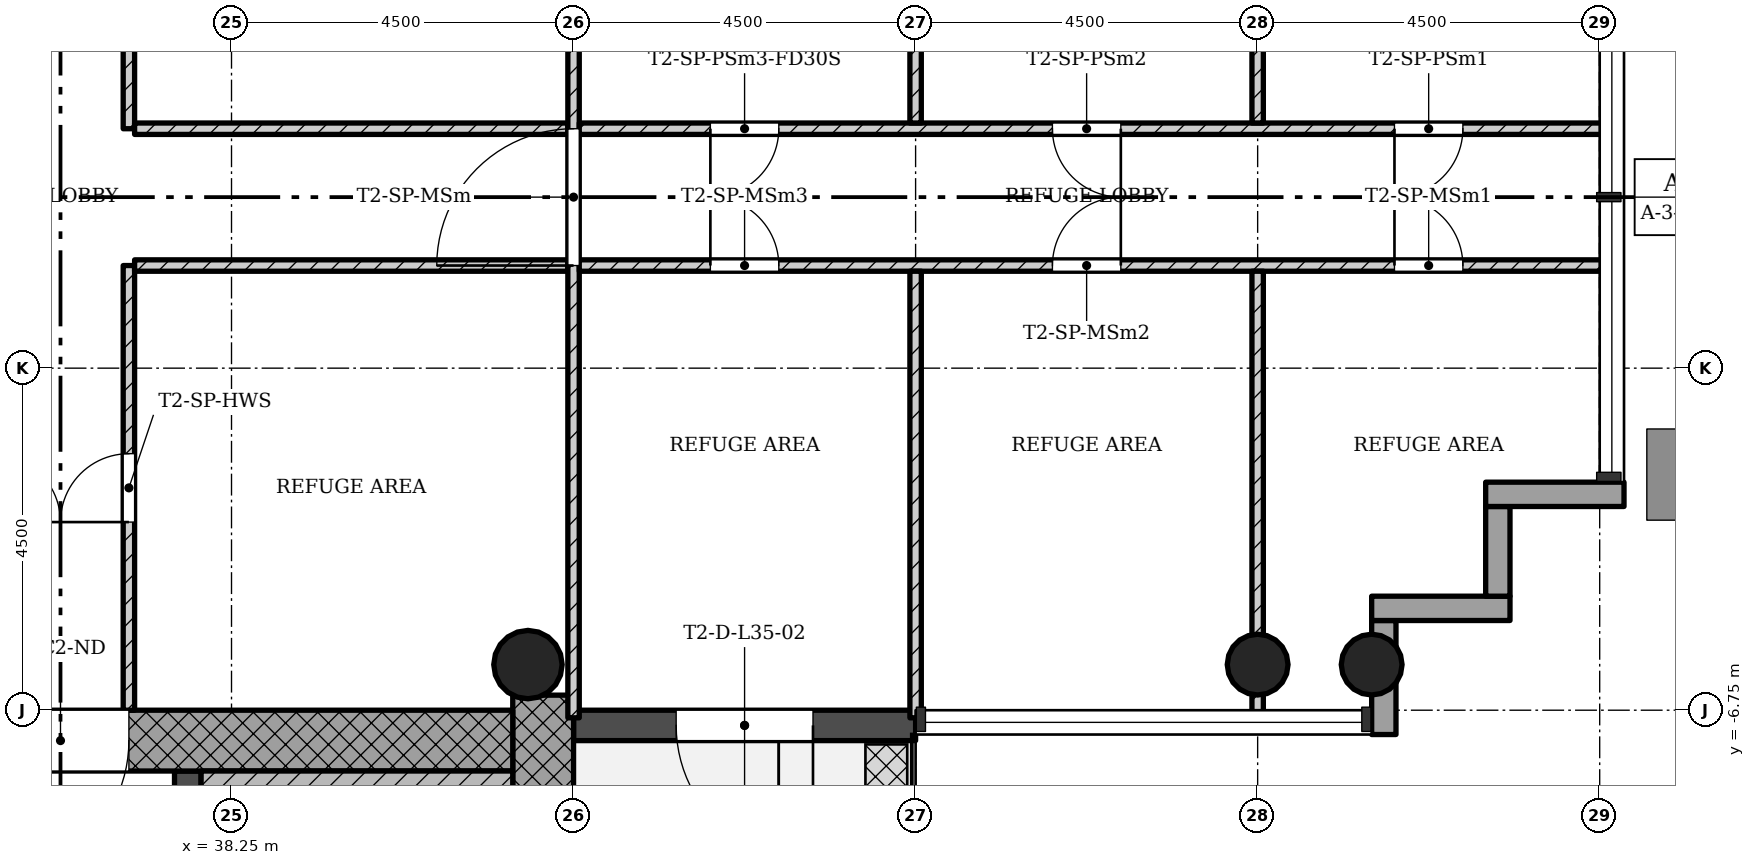
"""IFC4 building model, lengths in metres.
Left out: names, types, materials, properties, quantities, classifications, styles, units other than length and angle.
Written with IfcOpenShell. Run it as: python <this file> out.ifc"""

import sys

from ifc_helpers import new_model, si_unit, direction, frame, frame_2d, origin, origin_2d, place, context, subcontext, project, spatial, rectangle, hollow_circle, extrude, element, fill, save


model = new_model("IFC4")
c1 = context("Model", 3, precision=1e-05, world=origin(), true_north=direction((0.0, 1.0)))
c2 = subcontext(c1, "Body", "Model", "MODEL_VIEW")
j1 = project(units=[si_unit("LENGTHUNIT", "METRE"), si_unit("PLANEANGLEUNIT", "RADIAN")], contexts=[c1])
p1 = place(None, origin())
s1 = spatial("IfcSite", under=j1, at=p1, CompositionType="ELEMENT")
p2 = place(p1, origin())
s2 = spatial("IfcBuilding", under=s1, at=p2, CompositionType="ELEMENT")
p3 = place(p2, frame((0.0, 0.0, 128.7)))
s3 = spatial("IfcBuildingStorey", under=s2, at=p3, CompositionType="ELEMENT", Elevation=128.7)
p4 = place(p3, frame((42.35, -14.95, 0.0), z_axis=(0.0, 0.0, 1.0), x_axis=(0.0, 1.0, 0.0)))
e1 = element("IfcWall", 1, at=p4, inside=s3, PredefinedType="SHEAR", context=c2, shape_type="SweptSolid", body=[
    extrude(rectangle(XDim=8.398, YDim=0.8, at=frame_2d((4.199, 0.0))), origin(), (0.0, 0.0, 1.0), 5.0),
])
p5 = place(p3, frame((41.95, -7.15, 0.0), z_axis=(0.0, 0.0, 1.0), x_axis=(-1.0, 0.0, 0.0)))
e2 = element("IfcWall", 2, at=p5, inside=s3, PredefinedType="SHEAR", context=c2, shape_type="SweptSolid", body=[
    extrude(rectangle(XDim=12.7, YDim=0.8, at=frame_2d((6.35, 0.0))), origin(), (0.0, 0.0, 1.0), 5.0),
])
p6 = place(p5, frame((5.05, 0.0, 0.0)))
e3 = element("IfcOpeningElement", 3, at=p6, cuts=e2, PredefinedType="OPENING", context=c2, shape_type="SweptSolid", body=[
    extrude(rectangle(XDim=1.8, YDim=2.1, at=frame_2d((0.9, 1.05))), frame((0.0, 0.41, 0.0), z_axis=(0.0, -1.0, 0.0), x_axis=(1.0, 0.0, 0.0)), (0.0, 0.0, 1.0), 0.82),
])
p7 = place(p3, frame((37.675, -14.95, 0.0), z_axis=(0.0, 0.0, 1.0), x_axis=(0.0, 1.0, 0.0)))
e4 = element("IfcWall", 4, at=p7, inside=s3, PredefinedType="SHEAR", context=c2, shape_type="SweptSolid", body=[
    extrude(rectangle(XDim=7.4, YDim=0.35, at=frame_2d((3.7, 0.0))), origin(), (0.0, 0.0, 1.0), 5.0),
])
p8 = place(p7, frame((5.65, 0.0, 0.0)))
e5 = element("IfcOpeningElement", 5, at=p8, cuts=e4, PredefinedType="OPENING", context=c2, shape_type="SweptSolid", body=[
    extrude(rectangle(XDim=0.9, YDim=2.1, at=frame_2d((0.45, 1.05))), frame((0.0, 0.185, 0.0), z_axis=(0.0, -1.0, 0.0), x_axis=(1.0, 0.0, 0.0)), (0.0, 0.0, 1.0), 0.37),
])
for number, where, z_axis, x_axis in (
    (6, (51.75, -6.15, 0.0), (0.0, 0.0, 1.0), (1.0, 0.0, 0.0)),
    (7, (53.25, -6.15, 0.0), (0.0, 0.0, 1.0), (1.0, 0.0, 0.0)),
):
    element("IfcColumn", number, at=place(p3, frame(where, z_axis=z_axis, x_axis=x_axis)), inside=s3, PredefinedType="COLUMN", context=c2, shape_type="SweptSolid", body=[
        extrude(hollow_circle(Radius=0.4, WallThickness=0.028, at=origin_2d()), origin(), (0.0, 0.0, 1.0), 5.0),
    ])
p9 = place(p3, frame((42.15, -6.15, 0.0), z_axis=(0.0, 0.0, 1.0), x_axis=(1.0, 0.0, 0.0)))
e8 = element("IfcColumn", 8, at=p9, inside=s3, PredefinedType="COLUMN", context=c2, shape_type="SweptSolid", body=[
    extrude(hollow_circle(Radius=0.45, WallThickness=0.032, at=origin_2d()), origin(), (0.0, 0.0, 1.0), 5.0),
])
p10 = place(p3, frame((42.75, -6.95, -0.02), z_axis=(0.0, 0.0, 1.0), x_axis=(1.0, 0.0, 0.0)))
e9 = element("IfcWall", 9, at=p10, inside=s3, PredefinedType="STANDARD", context=c2, shape_type="SweptSolid", body=[
    extrude(rectangle(XDim=4.5, YDim=0.4, at=frame_2d((2.25, 0.0))), origin(), (0.0, 0.0, 1.0), 4.72),
])
p11 = place(p10, frame((1.35, 0.0, 0.02)))
e10 = element("IfcOpeningElement", 10, at=p11, cuts=e9, PredefinedType="OPENING", context=c2, shape_type="SweptSolid", body=[
    extrude(rectangle(XDim=1.8, YDim=2.1, at=frame_2d((0.9, 1.05))), frame((0.0, 0.21, 0.0), z_axis=(0.0, -1.0, 0.0), x_axis=(1.0, 0.0, 0.0)), (0.0, 0.0, 1.0), 0.42),
])
p12 = place(p3, frame((53.41, -7.07, -0.3), z_axis=(0.0, 0.0, 1.0), x_axis=(0.0, 1.0, 0.0)))
e11 = element("IfcWall", 11, at=p12, inside=s3, PredefinedType="STANDARD", context=c2, shape_type="SweptSolid", body=[
    extrude(rectangle(XDim=1.5, YDim=0.32, at=frame_2d((0.75, 0.0))), origin(), (0.0, 0.0, 1.0), 5.0),
])
p13 = place(p3, frame((53.25, -5.41, -0.3), z_axis=(0.0, 0.0, 1.0), x_axis=(1.0, 0.0, 0.0)))
e12 = element("IfcWall", 12, at=p13, inside=s3, PredefinedType="STANDARD", context=c2, shape_type="SweptSolid", body=[
    extrude(rectangle(XDim=1.82, YDim=0.32, at=frame_2d((0.91, 0.0))), origin(), (0.0, 0.0, 1.0), 5.0),
])
p14 = place(p3, frame((54.91, -5.25, -0.3), z_axis=(0.0, 0.0, 1.0), x_axis=(0.0, 1.0, 0.0)))
e13 = element("IfcWall", 13, at=p14, inside=s3, PredefinedType="STANDARD", context=c2, shape_type="SweptSolid", body=[
    extrude(rectangle(XDim=1.18, YDim=0.32, at=frame_2d((0.59, 0.0))), origin(), (0.0, 0.0, 1.0), 5.0),
])
p15 = place(p3, frame((54.75, -3.91, -0.3), z_axis=(0.0, 0.0, 1.0), x_axis=(1.0, 0.0, 0.0)))
e14 = element("IfcWall", 14, at=p15, inside=s3, PredefinedType="STANDARD", context=c2, shape_type="SweptSolid", body=[
    extrude(rectangle(XDim=1.82, YDim=0.32, at=frame_2d((0.91, 0.0))), origin(), (0.0, 0.0, 1.0), 5.0),
])
p16 = place(p3, frame((36.9, 0.9, 0.0), z_axis=(0.0, 0.0, 1.0), x_axis=(0.0, 1.0, 0.0)))
e15 = element("IfcWall", 15, at=p16, inside=s3, PredefinedType="PARTITIONING", context=c2, shape_type="SweptSolid", body=[
    extrude(rectangle(XDim=5.85, YDim=0.15, at=frame_2d((2.925, 0.0))), origin(), (0.0, 0.0, 1.0), 4.58),
])
p17 = place(p16, frame((2.475, 0.0, 0.0)))
e16 = element("IfcOpeningElement", 16, at=p17, cuts=e15, PredefinedType="OPENING", context=c2, shape_type="SweptSolid", body=[
    extrude(rectangle(XDim=0.9, YDim=2.1, at=frame_2d((0.45, 1.05))), frame((0.0, 0.085, 0.0), z_axis=(0.0, -1.0, 0.0), x_axis=(1.0, 0.0, 0.0)), (0.0, 0.0, 1.0), 0.17),
])
p18 = place(p3, frame((42.675, 0.9, 0.0), z_axis=(0.0, 0.0, 1.0), x_axis=(-1.0, 0.0, 0.0)))
e17 = element("IfcWall", 17, at=p18, inside=s3, PredefinedType="PARTITIONING", context=c2, shape_type="SweptSolid", body=[
    extrude(rectangle(XDim=5.7, YDim=0.15, at=frame_2d((2.85, 0.0))), origin(), (0.0, 0.0, 1.0), 4.58),
])
p19 = place(p3, frame((36.9, -6.75, 0.0), z_axis=(0.0, 0.0, 1.0), x_axis=(0.0, 1.0, 0.0)))
e18 = element("IfcWall", 18, at=p19, inside=s3, PredefinedType="PARTITIONING", context=c2, shape_type="SweptSolid", body=[
    extrude(rectangle(XDim=5.85, YDim=0.15, at=frame_2d((2.925, 0.0))), origin(), (0.0, 0.0, 1.0), 4.58),
])
p20 = place(p19, frame((2.475, 0.0, 0.0)))
e19 = element("IfcOpeningElement", 19, at=p20, cuts=e18, PredefinedType="OPENING", context=c2, shape_type="SweptSolid", body=[
    extrude(rectangle(XDim=0.9, YDim=2.1, at=frame_2d((0.45, 1.05))), frame((0.0, 0.085, 0.0), z_axis=(0.0, -1.0, 0.0), x_axis=(1.0, 0.0, 0.0)), (0.0, 0.0, 1.0), 0.17),
])
p21 = place(p3, frame((42.675, -0.9, 0.0), z_axis=(0.0, 0.0, 1.0), x_axis=(-1.0, 0.0, 0.0)))
e20 = element("IfcWall", 20, at=p21, inside=s3, PredefinedType="PARTITIONING", context=c2, shape_type="SweptSolid", body=[
    extrude(rectangle(XDim=5.7, YDim=0.15, at=frame_2d((2.85, 0.0))), origin(), (0.0, 0.0, 1.0), 4.58),
])
p22 = place(p3, frame((42.75, -6.85, 0.0), z_axis=(0.0, 0.0, 1.0), x_axis=(0.0, 1.0, 0.0)))
e21 = element("IfcWall", 21, at=p22, inside=s3, PredefinedType="PARTITIONING", context=c2, shape_type="SweptSolid", body=[
    extrude(rectangle(XDim=13.7, YDim=0.15, at=frame_2d((6.85, 0.0))), origin(), (0.0, 0.0, 1.0), 4.58),
])
p23 = place(p22, frame((5.95, 0.0, 0.0)))
e22 = element("IfcOpeningElement", 22, at=p23, cuts=e21, PredefinedType="OPENING", context=c2, shape_type="SweptSolid", body=[
    extrude(rectangle(XDim=1.8, YDim=2.1, at=frame_2d((0.9, 1.05))), frame((0.0, 0.085, 0.0), z_axis=(0.0, -1.0, 0.0), x_axis=(1.0, 0.0, 0.0)), (0.0, 0.0, 1.0), 0.17),
])
p24 = place(p3, frame((56.35, 0.9, 0.0), z_axis=(0.0, 0.0, 1.0), x_axis=(-1.0, 0.0, 0.0)))
e23 = element("IfcWall", 23, at=p24, inside=s3, PredefinedType="PARTITIONING", context=c2, shape_type="SweptSolid", body=[
    extrude(rectangle(XDim=13.525, YDim=0.15, at=frame_2d((6.763, 0.0))), origin(), (0.0, 0.0, 1.0), 4.58),
])
p25 = place(p24, frame((1.9, 0.0, 0.0)))
e24 = element("IfcOpeningElement", 24, at=p25, cuts=e23, PredefinedType="OPENING", context=c2, shape_type="SweptSolid", body=[
    extrude(rectangle(XDim=0.9, YDim=2.1, at=frame_2d((0.45, 1.05))), frame((0.0, 0.085, 0.0), z_axis=(0.0, -1.0, 0.0), x_axis=(1.0, 0.0, 0.0)), (0.0, 0.0, 1.0), 0.17),
])
p26 = place(p24, frame((6.4, 0.0, 0.0)))
e25 = element("IfcOpeningElement", 25, at=p26, cuts=e23, PredefinedType="OPENING", context=c2, shape_type="SweptSolid", body=[
    extrude(rectangle(XDim=0.9, YDim=2.1, at=frame_2d((0.45, 1.05))), frame((0.0, 0.085, 0.0), z_axis=(0.0, -1.0, 0.0), x_axis=(1.0, 0.0, 0.0)), (0.0, 0.0, 1.0), 0.17),
])
p27 = place(p24, frame((10.9, 0.0, 0.0)))
e26 = element("IfcOpeningElement", 26, at=p27, cuts=e23, PredefinedType="OPENING", context=c2, shape_type="SweptSolid", body=[
    extrude(rectangle(XDim=0.9, YDim=2.1, at=frame_2d((0.45, 1.05))), frame((0.0, 0.085, 0.0), z_axis=(0.0, -1.0, 0.0), x_axis=(1.0, 0.0, 0.0)), (0.0, 0.0, 1.0), 0.17),
])
for number, where, z_axis, x_axis in (
    (27, (51.75, 0.975, 0.0), (0.0, 0.0, 1.0), (0.0, 1.0, 0.0)),
    (28, (47.25, 0.975, 0.0), (0.0, 0.0, 1.0), (0.0, 1.0, 0.0)),
):
    element("IfcWall", number, at=place(p3, frame(where, z_axis=z_axis, x_axis=x_axis)), inside=s3, PredefinedType="PARTITIONING", context=c2, shape_type="SweptSolid", body=[
        extrude(rectangle(XDim=5.875, YDim=0.15, at=frame_2d((2.938, 0.0))), origin(), (0.0, 0.0, 1.0), 4.58),
    ])
p28 = place(p3, frame((56.35, -0.9, 0.0), z_axis=(0.0, 0.0, 1.0), x_axis=(-1.0, 0.0, 0.0)))
e29 = element("IfcWall", 29, at=p28, inside=s3, PredefinedType="PARTITIONING", context=c2, shape_type="SweptSolid", body=[
    extrude(rectangle(XDim=13.525, YDim=0.15, at=frame_2d((6.763, 0.0))), origin(), (0.0, 0.0, 1.0), 4.58),
])
p29 = place(p28, frame((1.9, 0.0, 0.0)))
e30 = element("IfcOpeningElement", 30, at=p29, cuts=e29, PredefinedType="OPENING", context=c2, shape_type="SweptSolid", body=[
    extrude(rectangle(XDim=0.9, YDim=2.1, at=frame_2d((0.45, 1.05))), frame((0.0, 0.085, 0.0), z_axis=(0.0, -1.0, 0.0), x_axis=(1.0, 0.0, 0.0)), (0.0, 0.0, 1.0), 0.17),
])
p30 = place(p28, frame((6.4, 0.0, 0.0)))
e31 = element("IfcOpeningElement", 31, at=p30, cuts=e29, PredefinedType="OPENING", context=c2, shape_type="SweptSolid", body=[
    extrude(rectangle(XDim=0.9, YDim=2.1, at=frame_2d((0.45, 1.05))), frame((0.0, 0.085, 0.0), z_axis=(0.0, -1.0, 0.0), x_axis=(1.0, 0.0, 0.0)), (0.0, 0.0, 1.0), 0.17),
])
p31 = place(p28, frame((10.9, 0.0, 0.0)))
e32 = element("IfcOpeningElement", 32, at=p31, cuts=e29, PredefinedType="OPENING", context=c2, shape_type="SweptSolid", body=[
    extrude(rectangle(XDim=0.9, YDim=2.1, at=frame_2d((0.45, 1.05))), frame((0.0, 0.085, 0.0), z_axis=(0.0, -1.0, 0.0), x_axis=(1.0, 0.0, 0.0)), (0.0, 0.0, 1.0), 0.17),
])
for number, where, z_axis, x_axis in (
    (33, (51.75, -0.975, 0.0), (0.0, 0.0, 1.0), (0.0, -1.0, 0.0)),
    (34, (47.25, -0.975, 0.0), (0.0, 0.0, 1.0), (0.0, -1.0, 0.0)),
):
    element("IfcWall", number, at=place(p3, frame(where, z_axis=z_axis, x_axis=x_axis)), inside=s3, PredefinedType="PARTITIONING", context=c2, shape_type="SweptSolid", body=[
        extrude(rectangle(XDim=5.875, YDim=0.15, at=frame_2d((2.938, 0.0))), origin(), (0.0, 0.0, 1.0), 4.58),
    ])
p32 = place(p3, frame((37.85, -7.75, 0.0), z_axis=(0.0, 0.0, 1.0), x_axis=(1.0, 0.0, 0.0)))
e35 = element("IfcWall", 35, at=p32, inside=s3, PredefinedType="SHEAR", context=c2, shape_type="SweptSolid", body=[
    extrude(rectangle(XDim=4.1, YDim=0.4, at=frame_2d((2.05, 0.0))), origin(), (0.0, 0.0, 1.0), 5.0),
])
p33 = place(p11, origin())
e36 = element("IfcDoor", 36, at=p33, inside=s3, OperationType="SINGLE_SWING_RIGHT", PredefinedType="DOOR", context=c2, shape_type="SweptSolid", body=[
    extrude(rectangle(XDim=1.8, YDim=2.1, at=frame_2d((0.9, 1.05))), frame((0.0, 0.025, 0.0), z_axis=(0.0, -1.0, 0.0), x_axis=(1.0, 0.0, 0.0)), (0.0, 0.0, 1.0), 0.05),
])
fill(e10, e36)
p34 = place(p20, origin())
e37 = element("IfcDoor", 37, at=p34, inside=s3, OperationType="SINGLE_SWING_RIGHT", PredefinedType="DOOR", context=c2, shape_type="SweptSolid", body=[
    extrude(rectangle(XDim=0.9, YDim=2.1, at=frame_2d((0.45, 1.05))), frame((0.0, 0.025, 0.0), z_axis=(0.0, -1.0, 0.0), x_axis=(1.0, 0.0, 0.0)), (0.0, 0.0, 1.0), 0.05),
])
fill(e19, e37)
p35 = place(p23, origin())
e38 = element("IfcDoor", 38, at=p35, inside=s3, OperationType="SINGLE_SWING_RIGHT", PredefinedType="DOOR", context=c2, shape_type="SweptSolid", body=[
    extrude(rectangle(XDim=1.8, YDim=2.1, at=frame_2d((0.9, 1.05))), frame((0.0, 0.025, 0.0), z_axis=(0.0, -1.0, 0.0), x_axis=(1.0, 0.0, 0.0)), (0.0, 0.0, 1.0), 0.05),
])
fill(e22, e38)
p36 = place(p25, origin())
e39 = element("IfcDoor", 39, at=p36, inside=s3, OperationType="SINGLE_SWING_LEFT", PredefinedType="DOOR", context=c2, shape_type="SweptSolid", body=[
    extrude(rectangle(XDim=0.9, YDim=2.1, at=frame_2d((0.45, 1.05))), frame((0.0, 0.025, 0.0), z_axis=(0.0, -1.0, 0.0), x_axis=(1.0, 0.0, 0.0)), (0.0, 0.0, 1.0), 0.05),
])
fill(e24, e39)
p37 = place(p26, origin())
e40 = element("IfcDoor", 40, at=p37, inside=s3, OperationType="SINGLE_SWING_RIGHT", PredefinedType="DOOR", context=c2, shape_type="SweptSolid", body=[
    extrude(rectangle(XDim=0.9, YDim=2.1, at=frame_2d((0.45, 1.05))), frame((0.0, 0.025, 0.0), z_axis=(0.0, -1.0, 0.0), x_axis=(1.0, 0.0, 0.0)), (0.0, 0.0, 1.0), 0.05),
])
fill(e25, e40)
p38 = place(p27, origin())
e41 = element("IfcDoor", 41, at=p38, inside=s3, OperationType="SINGLE_SWING_LEFT", PredefinedType="DOOR", context=c2, shape_type="SweptSolid", body=[
    extrude(rectangle(XDim=0.9, YDim=2.1, at=frame_2d((0.45, 1.05))), frame((0.0, 0.025, 0.0), z_axis=(0.0, -1.0, 0.0), x_axis=(1.0, 0.0, 0.0)), (0.0, 0.0, 1.0), 0.05),
])
fill(e26, e41)
p39 = place(p29, origin())
e42 = element("IfcDoor", 42, at=p39, inside=s3, OperationType="SINGLE_SWING_RIGHT", PredefinedType="DOOR", context=c2, shape_type="SweptSolid", body=[
    extrude(rectangle(XDim=0.9, YDim=2.1, at=frame_2d((0.45, 1.05))), frame((0.0, 0.025, 0.0), z_axis=(0.0, -1.0, 0.0), x_axis=(1.0, 0.0, 0.0)), (0.0, 0.0, 1.0), 0.05),
])
fill(e30, e42)
p40 = place(p30, origin())
e43 = element("IfcDoor", 43, at=p40, inside=s3, OperationType="SINGLE_SWING_LEFT", PredefinedType="DOOR", context=c2, shape_type="SweptSolid", body=[
    extrude(rectangle(XDim=0.9, YDim=2.1, at=frame_2d((0.45, 1.05))), frame((0.0, 0.025, 0.0), z_axis=(0.0, -1.0, 0.0), x_axis=(1.0, 0.0, 0.0)), (0.0, 0.0, 1.0), 0.05),
])
fill(e31, e43)
p41 = place(p31, origin())
e44 = element("IfcDoor", 44, at=p41, inside=s3, OperationType="SINGLE_SWING_RIGHT", PredefinedType="DOOR", context=c2, shape_type="SweptSolid", body=[
    extrude(rectangle(XDim=0.9, YDim=2.1, at=frame_2d((0.45, 1.05))), frame((0.0, 0.025, 0.0), z_axis=(0.0, -1.0, 0.0), x_axis=(1.0, 0.0, 0.0)), (0.0, 0.0, 1.0), 0.05),
])
fill(e32, e44)
p42 = place(p6, origin())
e45 = element("IfcDoor", 45, at=p42, inside=s3, OperationType="SINGLE_SWING_LEFT", PredefinedType="DOOR", context=c2, shape_type="SweptSolid", body=[
    extrude(rectangle(XDim=1.8, YDim=2.1, at=frame_2d((0.9, 1.05))), frame((0.0, 0.025, 0.0), z_axis=(0.0, -1.0, 0.0), x_axis=(1.0, 0.0, 0.0)), (0.0, 0.0, 1.0), 0.05),
])
fill(e3, e45)
save(model, sys.argv[1])
